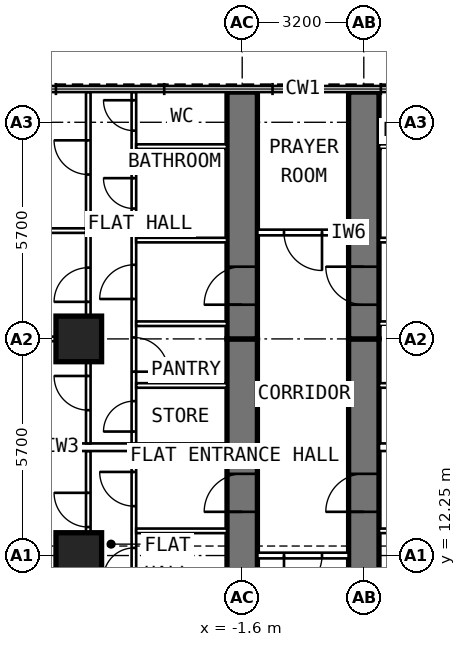
"""IFC4 building model, lengths in metres.
Left out: names, types, materials, properties, quantities, classifications, styles, units other than length and angle.
Written with IfcOpenShell. Run it as: python <this file> out.ifc"""

import sys

from ifc_helpers import new_model, si_unit, direction, frame, frame_2d, origin, origin_2d, place, context, subcontext, project, spatial, rectangle, extrude, element, fill, save


model = new_model("IFC4")
c1 = context("Model", 3, precision=1e-05, world=origin(), true_north=direction((0.0, 1.0)))
c2 = subcontext(c1, "Body", "Model", "MODEL_VIEW")
j1 = project(units=[si_unit("LENGTHUNIT", "METRE"), si_unit("PLANEANGLEUNIT", "RADIAN")], contexts=[c1])
p1 = place(None, origin())
s1 = spatial("IfcSite", under=j1, at=p1, CompositionType="ELEMENT")
p2 = place(p1, origin())
s2 = spatial("IfcBuilding", under=s1, at=p2, CompositionType="ELEMENT")
p3 = place(p2, frame((0.0, 0.0, 168.8)))
s3 = spatial("IfcBuildingStorey", under=s2, at=p3, CompositionType="ELEMENT", Elevation=168.8)
for number, where, z_axis, x_axis in (
    (1, (-5.9, 12.25, 0.0), (0.0, 0.0, 1.0), (0.0, 1.0, 0.0)),
    (2, (-5.9, 17.95, 0.0), (0.0, 0.0, 1.0), (0.0, 1.0, 0.0)),
):
    element("IfcColumn", number, at=place(p3, frame(where, z_axis=z_axis, x_axis=x_axis)), inside=s3, PredefinedType="COLUMN", context=c2, shape_type="SweptSolid", body=[
        extrude(rectangle(XDim=1.2, YDim=1.2, at=origin_2d()), origin(), (0.0, 0.0, 1.0), 3.6),
    ])
p4 = place(p3, frame((-1.6, 9.6, 0.0), z_axis=(0.0, 0.0, 1.0), x_axis=(0.0, 1.0, 0.0)))
e3 = element("IfcWall", 3, at=p4, inside=s3, PredefinedType="SHEAR", context=c2, shape_type="SweptSolid", body=[
    extrude(rectangle(XDim=8.35, YDim=0.8, at=frame_2d((4.175, 0.0))), origin(), (0.0, 0.0, 1.0), 3.6),
])
p5 = place(p4, frame((3.8, 0.0, 0.0)))
e4 = element("IfcOpeningElement", 4, at=p5, cuts=e3, PredefinedType="OPENING", context=c2, shape_type="SweptSolid", body=[
    extrude(rectangle(XDim=1.0, YDim=2.1, at=frame_2d((0.5, 1.05))), frame((0.0, 0.412, 0.0), z_axis=(0.0, -1.0, 0.0), x_axis=(1.0, 0.0, 0.0)), (0.0, 0.0, 1.0), 0.824),
])
p6 = place(p3, frame((-1.6, 17.95, 0.0), z_axis=(0.0, 0.0, 1.0), x_axis=(0.0, 1.0, 0.0)))
e5 = element("IfcWall", 5, at=p6, inside=s3, PredefinedType="SHEAR", context=c2, shape_type="SweptSolid", body=[
    extrude(rectangle(XDim=6.495, YDim=0.8, at=frame_2d((3.248, 0.0))), origin(), (0.0, 0.0, 1.0), 3.6),
])
p7 = place(p6, frame((0.9, 0.0, 0.0)))
e6 = element("IfcOpeningElement", 6, at=p7, cuts=e5, PredefinedType="OPENING", context=c2, shape_type="SweptSolid", body=[
    extrude(rectangle(XDim=1.0, YDim=2.1, at=frame_2d((0.5, 1.05))), frame((0.0, 0.412, 0.0), z_axis=(0.0, -1.0, 0.0), x_axis=(1.0, 0.0, 0.0)), (0.0, 0.0, 1.0), 0.824),
])
p8 = place(p3, frame((1.6, 9.6, 0.0), z_axis=(0.0, 0.0, 1.0), x_axis=(0.0, 1.0, 0.0)))
e7 = element("IfcWall", 7, at=p8, inside=s3, PredefinedType="SHEAR", context=c2, shape_type="SweptSolid", body=[
    extrude(rectangle(XDim=8.35, YDim=0.8, at=frame_2d((4.175, 0.0))), origin(), (0.0, 0.0, 1.0), 3.6),
])
p9 = place(p8, frame((3.8, 0.0, 0.0)))
e8 = element("IfcOpeningElement", 8, at=p9, cuts=e7, PredefinedType="OPENING", context=c2, shape_type="SweptSolid", body=[
    extrude(rectangle(XDim=1.0, YDim=2.1, at=frame_2d((0.5, 1.05))), frame((0.0, 0.412, 0.0), z_axis=(0.0, -1.0, 0.0), x_axis=(1.0, 0.0, 0.0)), (0.0, 0.0, 1.0), 0.824),
])
p10 = place(p3, frame((1.6, 17.95, 0.0), z_axis=(0.0, 0.0, 1.0), x_axis=(0.0, 1.0, 0.0)))
e9 = element("IfcWall", 9, at=p10, inside=s3, PredefinedType="SHEAR", context=c2, shape_type="SweptSolid", body=[
    extrude(rectangle(XDim=6.495, YDim=0.8, at=frame_2d((3.248, 0.0))), origin(), (0.0, 0.0, 1.0), 3.6),
])
p11 = place(p10, frame((0.9, 0.0, 0.0)))
e10 = element("IfcOpeningElement", 10, at=p11, cuts=e9, PredefinedType="OPENING", context=c2, shape_type="SweptSolid", body=[
    extrude(rectangle(XDim=1.0, YDim=2.1, at=frame_2d((0.5, 1.05))), frame((0.0, 0.412, 0.0), z_axis=(0.0, -1.0, 0.0), x_axis=(1.0, 0.0, 0.0)), (0.0, 0.0, 1.0), 0.824),
])
p12 = place(p3, frame((-4.45, 10.05, 0.0), z_axis=(0.0, 0.0, 1.0), x_axis=(0.0, 1.0, 0.0)))
e11 = element("IfcWall", 11, at=p12, inside=s3, PredefinedType="PARTITIONING", context=c2, shape_type="SweptSolid", body=[
    extrude(rectangle(XDim=4.95, YDim=0.12, at=frame_2d((2.475, 0.0))), origin(), (0.0, 0.0, 1.0), 3.35),
])
p13 = place(p12, frame((1.6, 0.0, 0.0)))
e12 = element("IfcOpeningElement", 12, at=p13, cuts=e11, PredefinedType="OPENING", context=c2, shape_type="SweptSolid", body=[
    extrude(rectangle(XDim=0.8, YDim=2.1, at=frame_2d((0.4, 1.05))), frame((0.0, 0.072, 0.0), z_axis=(0.0, -1.0, 0.0), x_axis=(1.0, 0.0, 0.0)), (0.0, 0.0, 1.0), 0.144),
])
p14 = place(p12, frame((3.5, 0.0, 0.0)))
e13 = element("IfcOpeningElement", 13, at=p14, cuts=e11, PredefinedType="OPENING", context=c2, shape_type="SweptSolid", body=[
    extrude(rectangle(XDim=0.9, YDim=2.1, at=frame_2d((0.45, 1.05))), frame((0.0, 0.072, 0.0), z_axis=(0.0, -1.0, 0.0), x_axis=(1.0, 0.0, 0.0)), (0.0, 0.0, 1.0), 0.144),
])
p15 = place(p3, frame((-5.65, 9.6, 0.0), z_axis=(0.0, 0.0, 1.0), x_axis=(0.0, 1.0, 0.0)))
e14 = element("IfcWall", 14, at=p15, inside=s3, PredefinedType="PARTITIONING", context=c2, shape_type="SweptSolid", body=[
    extrude(rectangle(XDim=5.4, YDim=0.12, at=frame_2d((2.7, 0.0))), origin(), (0.0, 0.0, 1.0), 3.35),
])
p16 = place(p15, frame((3.4, 0.0, 0.0)))
e15 = element("IfcOpeningElement", 15, at=p16, cuts=e14, PredefinedType="OPENING", context=c2, shape_type="SweptSolid", body=[
    extrude(rectangle(XDim=0.9, YDim=2.1, at=frame_2d((0.45, 1.05))), frame((0.0, 0.072, 0.0), z_axis=(0.0, -1.0, 0.0), x_axis=(1.0, 0.0, 0.0)), (0.0, 0.0, 1.0), 0.144),
])
p17 = place(p3, frame((-2.0, 12.9, 0.0), z_axis=(0.0, 0.0, 1.0), x_axis=(-1.0, 0.0, 0.0)))
e16 = element("IfcWall", 16, at=p17, inside=s3, PredefinedType="PARTITIONING", context=c2, shape_type="SweptSolid", body=[
    extrude(rectangle(XDim=2.39, YDim=0.12, at=frame_2d((1.195, 0.0))), origin(), (0.0, 0.0, 1.0), 3.35),
])
p18 = place(p3, frame((-4.45, 15.2, 0.0), z_axis=(0.0, 0.0, 1.0), x_axis=(0.0, 1.0, 0.0)))
e17 = element("IfcWall", 17, at=p18, inside=s3, PredefinedType="PARTITIONING", context=c2, shape_type="SweptSolid", body=[
    extrude(rectangle(XDim=9.245, YDim=0.12, at=frame_2d((4.623, 0.0))), origin(), (0.0, 0.0, 1.0), 3.35),
])
p19 = place(p18, frame((0.312, 0.0, 0.0)))
e18 = element("IfcOpeningElement", 18, at=p19, cuts=e17, PredefinedType="OPENING", context=c2, shape_type="SweptSolid", body=[
    extrude(rectangle(XDim=0.8, YDim=2.1, at=frame_2d((0.4, 1.05))), frame((0.0, 0.072, 0.0), z_axis=(0.0, -1.0, 0.0), x_axis=(1.0, 0.0, 0.0)), (0.0, 0.0, 1.0), 0.144),
])
p20 = place(p18, frame((1.887, 0.0, 0.0)))
e19 = element("IfcOpeningElement", 19, at=p20, cuts=e17, PredefinedType="OPENING", context=c2, shape_type="SweptSolid", body=[
    extrude(rectangle(XDim=0.9, YDim=2.1, at=frame_2d((0.45, 1.05))), frame((0.0, 0.072, 0.0), z_axis=(0.0, -1.0, 0.0), x_axis=(1.0, 0.0, 0.0)), (0.0, 0.0, 1.0), 0.144),
])
p21 = place(p18, frame((3.8, 0.0, 0.0)))
e20 = element("IfcOpeningElement", 20, at=p21, cuts=e17, PredefinedType="OPENING", context=c2, shape_type="SweptSolid", body=[
    extrude(rectangle(XDim=0.9, YDim=2.1, at=frame_2d((0.45, 1.05))), frame((0.0, 0.072, 0.0), z_axis=(0.0, -1.0, 0.0), x_axis=(1.0, 0.0, 0.0)), (0.0, 0.0, 1.0), 0.144),
])
p22 = place(p18, frame((6.18, 0.0, 0.0)))
e21 = element("IfcOpeningElement", 21, at=p22, cuts=e17, PredefinedType="OPENING", context=c2, shape_type="SweptSolid", body=[
    extrude(rectangle(XDim=0.8, YDim=2.1, at=frame_2d((0.4, 1.05))), frame((0.0, 0.072, 0.0), z_axis=(0.0, -1.0, 0.0), x_axis=(1.0, 0.0, 0.0)), (0.0, 0.0, 1.0), 0.144),
])
p23 = place(p18, frame((8.23, 0.0, 0.0)))
e22 = element("IfcOpeningElement", 22, at=p23, cuts=e17, PredefinedType="OPENING", context=c2, shape_type="SweptSolid", body=[
    extrude(rectangle(XDim=0.8, YDim=2.1, at=frame_2d((0.4, 1.05))), frame((0.0, 0.072, 0.0), z_axis=(0.0, -1.0, 0.0), x_axis=(1.0, 0.0, 0.0)), (0.0, 0.0, 1.0), 0.144),
])
p24 = place(p3, frame((-5.65, 15.2, 0.0), z_axis=(0.0, 0.0, 1.0), x_axis=(0.0, 1.0, 0.0)))
e23 = element("IfcWall", 23, at=p24, inside=s3, PredefinedType="PARTITIONING", context=c2, shape_type="SweptSolid", body=[
    extrude(rectangle(XDim=9.245, YDim=0.12, at=frame_2d((4.623, 0.0))), origin(), (0.0, 0.0, 1.0), 3.35),
])
p25 = place(p24, frame((0.875, 0.0, 0.0)))
e24 = element("IfcOpeningElement", 24, at=p25, cuts=e23, PredefinedType="OPENING", context=c2, shape_type="SweptSolid", body=[
    extrude(rectangle(XDim=0.9, YDim=2.1, at=frame_2d((0.45, 1.05))), frame((0.0, 0.072, 0.0), z_axis=(0.0, -1.0, 0.0), x_axis=(1.0, 0.0, 0.0)), (0.0, 0.0, 1.0), 0.144),
])
p26 = place(p24, frame((3.725, 0.0, 0.0)))
e25 = element("IfcOpeningElement", 25, at=p26, cuts=e23, PredefinedType="OPENING", context=c2, shape_type="SweptSolid", body=[
    extrude(rectangle(XDim=0.9, YDim=2.1, at=frame_2d((0.45, 1.05))), frame((0.0, 0.072, 0.0), z_axis=(0.0, -1.0, 0.0), x_axis=(1.0, 0.0, 0.0)), (0.0, 0.0, 1.0), 0.144),
])
p27 = place(p24, frame((7.075, 0.0, 0.0)))
e26 = element("IfcOpeningElement", 26, at=p27, cuts=e23, PredefinedType="OPENING", context=c2, shape_type="SweptSolid", body=[
    extrude(rectangle(XDim=0.9, YDim=2.1, at=frame_2d((0.45, 1.05))), frame((0.0, 0.072, 0.0), z_axis=(0.0, -1.0, 0.0), x_axis=(1.0, 0.0, 0.0)), (0.0, 0.0, 1.0), 0.144),
])
p28 = place(p3, frame((-5.71, 17.95, 0.0), z_axis=(0.0, 0.0, 1.0), x_axis=(-1.0, 0.0, 0.0)))
e27 = element("IfcWall", 27, at=p28, inside=s3, PredefinedType="PARTITIONING", context=c2, shape_type="SweptSolid", body=[
    extrude(rectangle(XDim=4.99, YDim=0.12, at=frame_2d((2.495, 0.0))), origin(), (0.0, 0.0, 1.0), 2.45),
])
p29 = place(p3, frame((-5.71, 20.8, 0.0), z_axis=(0.0, 0.0, 1.0), x_axis=(-1.0, 0.0, 0.0)))
e28 = element("IfcWall", 28, at=p29, inside=s3, PredefinedType="PARTITIONING", context=c2, shape_type="SweptSolid", body=[
    extrude(rectangle(XDim=4.99, YDim=0.12, at=frame_2d((2.495, 0.0))), origin(), (0.0, 0.0, 1.0), 3.35),
])
for number, where, z_axis, x_axis in (
    (29, (-2.0, 16.725, 0.0), (0.0, 0.0, 1.0), (-1.0, 0.0, 0.0)),
    (30, (-2.0, 18.35, 0.0), (0.0, 0.0, 1.0), (-1.0, 0.0, 0.0)),
    (31, (-2.0, 20.55, 0.0), (0.0, 0.0, 1.0), (-1.0, 0.0, 0.0)),
    (32, (-2.0, 23.01, 0.0), (0.0, 0.0, 1.0), (-1.0, 0.0, 0.0)),
):
    element("IfcWall", number, at=place(p3, frame(where, z_axis=z_axis, x_axis=x_axis)), inside=s3, PredefinedType="PARTITIONING", context=c2, shape_type="SweptSolid", body=[
        extrude(rectangle(XDim=2.39, YDim=0.12, at=frame_2d((1.195, 0.0))), origin(), (0.0, 0.0, 1.0), 3.35),
    ])
p30 = place(p3, frame((-2.0, 15.1, 0.0), z_axis=(0.0, 0.0, 1.0), x_axis=(-1.0, 0.0, 0.0)))
e33 = element("IfcWall", 33, at=p30, inside=s3, PredefinedType="PARTITIONING", context=c2, shape_type="SweptSolid", body=[
    extrude(rectangle(XDim=8.7, YDim=0.2, at=frame_2d((4.35, 0.0))), origin(), (0.0, 0.0, 1.0), 3.35),
])
for number, where, z_axis, x_axis in (
    (34, (2.0, 12.9, 0.0), (0.0, 0.0, 1.0), (1.0, 0.0, 0.0)),
    (35, (2.0, 16.725, 0.0), (0.0, 0.0, 1.0), (1.0, 0.0, 0.0)),
    (36, (2.0, 18.35, 0.0), (0.0, 0.0, 1.0), (1.0, 0.0, 0.0)),
    (37, (2.0, 20.55, 0.0), (0.0, 0.0, 1.0), (1.0, 0.0, 0.0)),
    (38, (2.0, 23.01, 0.0), (0.0, 0.0, 1.0), (1.0, 0.0, 0.0)),
):
    element("IfcWall", number, at=place(p3, frame(where, z_axis=z_axis, x_axis=x_axis)), inside=s3, PredefinedType="PARTITIONING", context=c2, shape_type="SweptSolid", body=[
        extrude(rectangle(XDim=2.39, YDim=0.12, at=frame_2d((1.195, 0.0))), origin(), (0.0, 0.0, 1.0), 3.35),
    ])
p31 = place(p3, frame((2.0, 15.1, 0.0), z_axis=(0.0, 0.0, 1.0), x_axis=(1.0, 0.0, 0.0)))
e39 = element("IfcWall", 39, at=p31, inside=s3, PredefinedType="PARTITIONING", context=c2, shape_type="SweptSolid", body=[
    extrude(rectangle(XDim=8.7, YDim=0.2, at=frame_2d((4.35, 0.0))), origin(), (0.0, 0.0, 1.0), 3.35),
])
p32 = place(p3, frame((1.2, 20.75, 0.0), z_axis=(0.0, 0.0, 1.0), x_axis=(-1.0, 0.0, 0.0)))
e40 = element("IfcWall", 40, at=p32, inside=s3, PredefinedType="PARTITIONING", context=c2, shape_type="SweptSolid", body=[
    extrude(rectangle(XDim=2.4, YDim=0.15, at=frame_2d((1.2, 0.0))), origin(), (0.0, 0.0, 1.0), 3.35),
])
p33 = place(p32, frame((0.7, 0.0, 0.0)))
e41 = element("IfcOpeningElement", 41, at=p33, cuts=e40, PredefinedType="OPENING", context=c2, shape_type="SweptSolid", body=[
    extrude(rectangle(XDim=1.0, YDim=2.1, at=frame_2d((0.5, 1.05))), frame((0.0, 0.087, 0.0), z_axis=(0.0, -1.0, 0.0), x_axis=(1.0, 0.0, 0.0)), (0.0, 0.0, 1.0), 0.174),
])
p34 = place(p3, frame((1.2, 12.25, 0.0), z_axis=(0.0, 0.0, 1.0), x_axis=(-1.0, 0.0, 0.0)))
e42 = element("IfcWall", 42, at=p34, inside=s3, PredefinedType="PARTITIONING", context=c2, shape_type="SweptSolid", body=[
    extrude(rectangle(XDim=2.4, YDim=0.15, at=frame_2d((1.2, 0.0))), origin(), (0.0, 0.0, 1.0), 3.35),
])
p35 = place(p34, frame((0.7, 0.0, 0.0)))
e43 = element("IfcOpeningElement", 43, at=p35, cuts=e42, PredefinedType="OPENING", context=c2, shape_type="SweptSolid", body=[
    extrude(rectangle(XDim=1.0, YDim=2.1, at=frame_2d((0.5, 1.05))), frame((0.0, 0.087, 0.0), z_axis=(0.0, -1.0, 0.0), x_axis=(1.0, 0.0, 0.0)), (0.0, 0.0, 1.0), 0.174),
])
p36 = place(p5, origin())
e44 = element("IfcDoor", 44, at=p36, inside=s3, OperationType="SINGLE_SWING_LEFT", PredefinedType="DOOR", context=c2, shape_type="SweptSolid", body=[
    extrude(rectangle(XDim=1.0, YDim=2.1, at=frame_2d((0.5, 1.05))), frame((0.0, 0.15, 0.0), z_axis=(0.0, -1.0, 0.0), x_axis=(1.0, 0.0, 0.0)), (0.0, 0.0, 1.0), 0.3),
])
fill(e4, e44)
p37 = place(p16, origin())
e45 = element("IfcDoor", 45, at=p37, inside=s3, OperationType="SINGLE_SWING_RIGHT", PredefinedType="DOOR", context=c2, shape_type="SweptSolid", body=[
    extrude(rectangle(XDim=0.9, YDim=2.1, at=frame_2d((0.45, 1.05))), frame((0.0, 0.025, 0.0), z_axis=(0.0, -1.0, 0.0), x_axis=(1.0, 0.0, 0.0)), (0.0, 0.0, 1.0), 0.05),
])
fill(e15, e45)
p38 = place(p13, origin())
e46 = element("IfcDoor", 46, at=p38, inside=s3, OperationType="SINGLE_SWING_LEFT", PredefinedType="DOOR", context=c2, shape_type="SweptSolid", body=[
    extrude(rectangle(XDim=0.8, YDim=2.1, at=frame_2d((0.4, 1.05))), frame((0.0, 0.025, 0.0), z_axis=(0.0, -1.0, 0.0), x_axis=(1.0, 0.0, 0.0)), (0.0, 0.0, 1.0), 0.05),
])
fill(e12, e46)
p39 = place(p14, origin())
e47 = element("IfcDoor", 47, at=p39, inside=s3, OperationType="SINGLE_SWING_RIGHT", PredefinedType="DOOR", context=c2, shape_type="SweptSolid", body=[
    extrude(rectangle(XDim=0.9, YDim=2.1, at=frame_2d((0.45, 1.05))), frame((0.0, 0.025, 0.0), z_axis=(0.0, -1.0, 0.0), x_axis=(1.0, 0.0, 0.0)), (0.0, 0.0, 1.0), 0.05),
])
fill(e13, e47)
p40 = place(p7, origin())
e48 = element("IfcDoor", 48, at=p40, inside=s3, OperationType="SINGLE_SWING_LEFT", PredefinedType="DOOR", context=c2, shape_type="SweptSolid", body=[
    extrude(rectangle(XDim=1.0, YDim=2.1, at=frame_2d((0.5, 1.05))), frame((0.0, 0.15, 0.0), z_axis=(0.0, -1.0, 0.0), x_axis=(1.0, 0.0, 0.0)), (0.0, 0.0, 1.0), 0.3),
])
fill(e6, e48)
p41 = place(p25, origin())
e49 = element("IfcDoor", 49, at=p41, inside=s3, OperationType="SINGLE_SWING_RIGHT", PredefinedType="DOOR", context=c2, shape_type="SweptSolid", body=[
    extrude(rectangle(XDim=0.9, YDim=2.1, at=frame_2d((0.45, 1.05))), frame((0.0, 0.025, 0.0), z_axis=(0.0, -1.0, 0.0), x_axis=(1.0, 0.0, 0.0)), (0.0, 0.0, 1.0), 0.05),
])
fill(e24, e49)
p42 = place(p26, origin())
e50 = element("IfcDoor", 50, at=p42, inside=s3, OperationType="SINGLE_SWING_LEFT", PredefinedType="DOOR", context=c2, shape_type="SweptSolid", body=[
    extrude(rectangle(XDim=0.9, YDim=2.1, at=frame_2d((0.45, 1.05))), frame((0.0, 0.025, 0.0), z_axis=(0.0, -1.0, 0.0), x_axis=(1.0, 0.0, 0.0)), (0.0, 0.0, 1.0), 0.05),
])
fill(e25, e50)
p43 = place(p27, origin())
e51 = element("IfcDoor", 51, at=p43, inside=s3, OperationType="SINGLE_SWING_RIGHT", PredefinedType="DOOR", context=c2, shape_type="SweptSolid", body=[
    extrude(rectangle(XDim=0.9, YDim=2.1, at=frame_2d((0.45, 1.05))), frame((0.0, 0.025, 0.0), z_axis=(0.0, -1.0, 0.0), x_axis=(1.0, 0.0, 0.0)), (0.0, 0.0, 1.0), 0.05),
])
fill(e26, e51)
p44 = place(p19, origin())
e52 = element("IfcDoor", 52, at=p44, inside=s3, OperationType="SINGLE_SWING_LEFT", PredefinedType="DOOR", context=c2, shape_type="SweptSolid", body=[
    extrude(rectangle(XDim=0.8, YDim=2.1, at=frame_2d((0.4, 1.05))), frame((0.0, 0.025, 0.0), z_axis=(0.0, -1.0, 0.0), x_axis=(1.0, 0.0, 0.0)), (0.0, 0.0, 1.0), 0.05),
])
fill(e18, e52)
p45 = place(p20, frame((0.9, 0.0, 0.0), z_axis=(0.0, 0.0, 1.0), x_axis=(-1.0, 0.0, 0.0)))
e53 = element("IfcDoor", 53, at=p45, inside=s3, OperationType="SINGLE_SWING_RIGHT", PredefinedType="DOOR", context=c2, shape_type="SweptSolid", body=[
    extrude(rectangle(XDim=0.9, YDim=2.1, at=frame_2d((0.45, 1.05))), frame((0.0, 0.025, 0.0), z_axis=(0.0, -1.0, 0.0), x_axis=(1.0, 0.0, 0.0)), (0.0, 0.0, 1.0), 0.05),
])
fill(e19, e53)
p46 = place(p21, origin())
e54 = element("IfcDoor", 54, at=p46, inside=s3, OperationType="SINGLE_SWING_LEFT", PredefinedType="DOOR", context=c2, shape_type="SweptSolid", body=[
    extrude(rectangle(XDim=0.9, YDim=2.1, at=frame_2d((0.45, 1.05))), frame((0.0, 0.025, 0.0), z_axis=(0.0, -1.0, 0.0), x_axis=(1.0, 0.0, 0.0)), (0.0, 0.0, 1.0), 0.05),
])
fill(e20, e54)
p47 = place(p22, origin())
e55 = element("IfcDoor", 55, at=p47, inside=s3, OperationType="SINGLE_SWING_RIGHT", PredefinedType="DOOR", context=c2, shape_type="SweptSolid", body=[
    extrude(rectangle(XDim=0.8, YDim=2.1, at=frame_2d((0.4, 1.05))), frame((0.0, 0.025, 0.0), z_axis=(0.0, -1.0, 0.0), x_axis=(1.0, 0.0, 0.0)), (0.0, 0.0, 1.0), 0.05),
])
fill(e21, e55)
p48 = place(p23, origin())
e56 = element("IfcDoor", 56, at=p48, inside=s3, OperationType="SINGLE_SWING_RIGHT", PredefinedType="DOOR", context=c2, shape_type="SweptSolid", body=[
    extrude(rectangle(XDim=0.8, YDim=2.1, at=frame_2d((0.4, 1.05))), frame((0.0, 0.025, 0.0), z_axis=(0.0, -1.0, 0.0), x_axis=(1.0, 0.0, 0.0)), (0.0, 0.0, 1.0), 0.05),
])
fill(e22, e56)
p49 = place(p9, origin())
e57 = element("IfcDoor", 57, at=p49, inside=s3, OperationType="SINGLE_SWING_LEFT", PredefinedType="DOOR", context=c2, shape_type="SweptSolid", body=[
    extrude(rectangle(XDim=1.0, YDim=2.1, at=frame_2d((0.5, 1.05))), frame((0.0, 0.15, 0.0), z_axis=(0.0, -1.0, 0.0), x_axis=(1.0, 0.0, 0.0)), (0.0, 0.0, 1.0), 0.3),
])
fill(e8, e57)
p50 = place(p11, origin())
e58 = element("IfcDoor", 58, at=p50, inside=s3, OperationType="SINGLE_SWING_RIGHT", PredefinedType="DOOR", context=c2, shape_type="SweptSolid", body=[
    extrude(rectangle(XDim=1.0, YDim=2.1, at=frame_2d((0.5, 1.05))), frame((0.0, 0.15, 0.0), z_axis=(0.0, -1.0, 0.0), x_axis=(1.0, 0.0, 0.0)), (0.0, 0.0, 1.0), 0.3),
])
fill(e10, e58)
p51 = place(p33, origin())
e59 = element("IfcDoor", 59, at=p51, inside=s3, OperationType="SINGLE_SWING_LEFT", PredefinedType="DOOR", context=c2, shape_type="SweptSolid", body=[
    extrude(rectangle(XDim=1.0, YDim=2.1, at=frame_2d((0.5, 1.05))), frame((0.0, 0.025, 0.0), z_axis=(0.0, -1.0, 0.0), x_axis=(1.0, 0.0, 0.0)), (0.0, 0.0, 1.0), 0.05),
])
fill(e41, e59)
p52 = place(p35, origin())
e60 = element("IfcDoor", 60, at=p52, inside=s3, OperationType="SINGLE_SWING_RIGHT", PredefinedType="DOOR", context=c2, shape_type="SweptSolid", body=[
    extrude(rectangle(XDim=1.0, YDim=2.1, at=frame_2d((0.5, 1.05))), frame((0.0, 0.025, 0.0), z_axis=(0.0, -1.0, 0.0), x_axis=(1.0, 0.0, 0.0)), (0.0, 0.0, 1.0), 0.05),
])
fill(e43, e60)
save(model, sys.argv[1])
